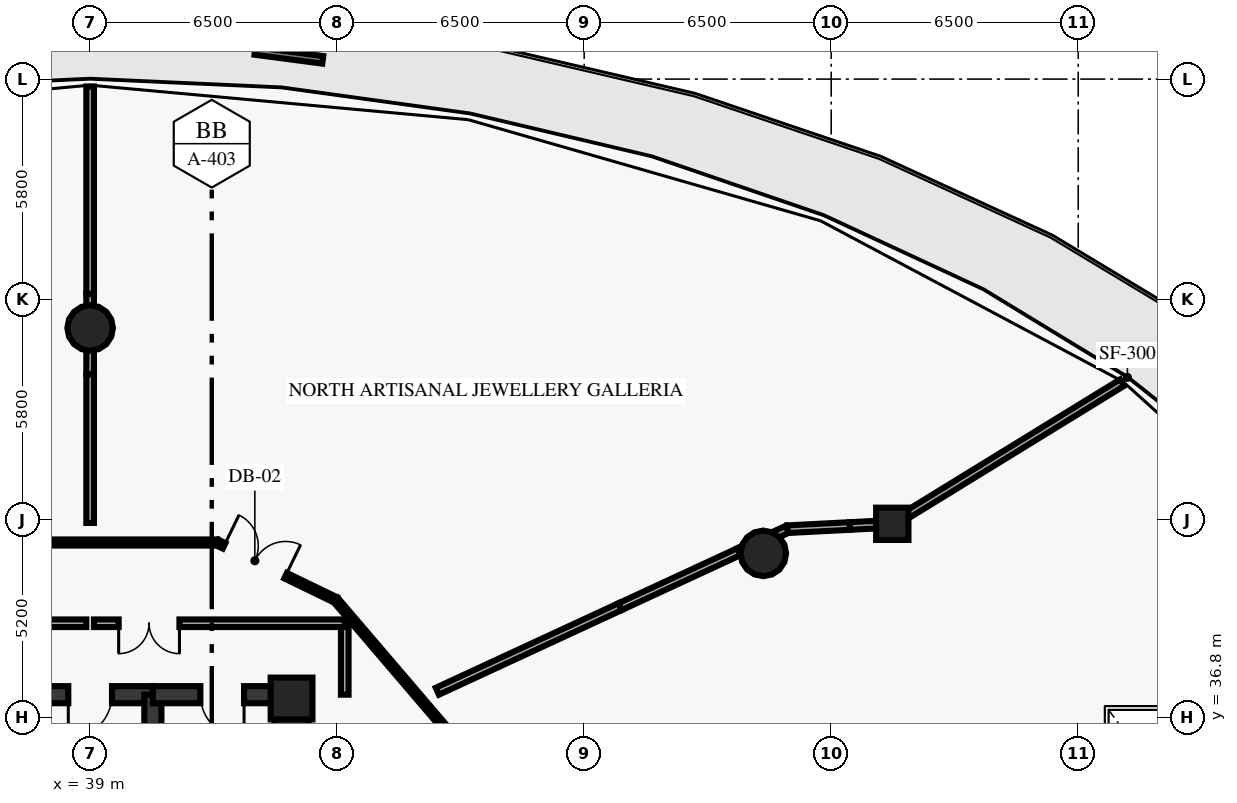
"""IFC4 building model, lengths in metres.
Left out: names, types, materials, properties, quantities, classifications, styles, units other than length and angle.
Written with IfcOpenShell. Run it as: python <this file> out.ifc"""

import sys

from ifc_helpers import new_model, si_unit, direction, frame, frame_2d, origin, origin_2d, place, context, subcontext, project, spatial, rectangle, circle, extrude, element, fill, save


model = new_model("IFC4")
c1 = context("Model", 3, precision=1e-05, world=origin(), true_north=direction((0.0, 1.0)))
c2 = subcontext(c1, "Body", "Model", "MODEL_VIEW")
j1 = project(units=[si_unit("LENGTHUNIT", "METRE"), si_unit("PLANEANGLEUNIT", "RADIAN")], contexts=[c1])
p1 = place(None, origin())
s1 = spatial("IfcSite", under=j1, at=p1, CompositionType="ELEMENT")
p2 = place(p1, origin())
s2 = spatial("IfcBuilding", under=s1, at=p2, CompositionType="ELEMENT")
p3 = place(p2, frame((0.0, 0.0, 6.0)))
s3 = spatial("IfcBuildingStorey", under=s2, at=p3, CompositionType="ELEMENT", Elevation=6.0)
p4 = place(p3, frame((44.3, 37.3, 0.0), z_axis=(0.0, 0.0, 1.0), x_axis=(1.0, 0.0, 0.0)))
e1 = element("IfcColumn", 1, at=p4, inside=s3, PredefinedType="PILASTER", context=c2, shape_type="SweptSolid", body=[
    extrude(rectangle(XDim=1.1, YDim=1.1, at=origin_2d()), origin(), (0.0, 0.0, 1.0), 4.7),
])
for number, where, z_axis, x_axis in (
    (2, (56.713, 41.119, 0.0), (0.0, 0.0, 1.0), (1.0, 0.0, 0.0)),
    (3, (39.0, 47.05, 0.0), (0.0, 0.0, 1.0), (1.0, 0.0, 0.0)),
):
    element("IfcColumn", number, at=place(p3, frame(where, z_axis=z_axis, x_axis=x_axis)), inside=s3, PredefinedType="COLUMN", context=c2, shape_type="SweptSolid", body=[
        extrude(circle(Radius=0.6, at=origin_2d()), origin(), (0.0, 0.0, 1.0), 4.7),
    ])
p5 = place(p3, frame((60.107, 41.897, 0.0), z_axis=(0.0, 0.0, 1.0), x_axis=(1.0, 0.0, 0.0)))
e4 = element("IfcColumn", 4, at=p5, inside=s3, PredefinedType="COLUMN", context=c2, shape_type="SweptSolid", body=[
    extrude(rectangle(XDim=0.85, YDim=0.85, at=origin_2d()), origin(), (0.0, 0.0, 1.0), 4.7),
])
p6 = place(p3, frame((44.3, 29.05, 0.0), z_axis=(0.0, 0.0, 1.0), x_axis=(0.0, 1.0, 0.0)))
e5 = element("IfcWall", 5, at=p6, inside=s3, PredefinedType="SHEAR", context=c2, shape_type="SweptSolid", body=[
    extrude(rectangle(XDim=8.35, YDim=0.9, at=frame_2d((4.175, 0.0))), origin(), (0.0, 0.0, 1.0), 4.7),
])
p7 = place(p3, frame((43.337, 54.341, 0.0), z_axis=(0.0, 0.0, 1.0), x_axis=(0.991429342672, -0.130644014367, 0.0)))
e6 = element("IfcWall", 6, at=p7, inside=s3, PredefinedType="ELEMENTEDWALL", context=c2, shape_type="SweptSolid", body=[
    extrude(rectangle(XDim=1.8, YDim=0.2, at=frame_2d((0.9, 0.0))), origin(), (0.0, 0.0, 1.0), 0.65),
])
p8 = place(p3, frame((40.65, 37.4, 0.0), z_axis=(0.0, 0.0, 1.0), x_axis=(-1.0, 0.0, 0.0)))
e7 = element("IfcWall", 7, at=p8, inside=s3, PredefinedType="SHEAR", context=c2, shape_type="SweptSolid", body=[
    extrude(rectangle(XDim=3.3, YDim=0.45, at=frame_2d((1.65, 0.0))), origin(), (0.0, 0.0, 1.0), 4.7),
])
p9 = place(p8, frame((1.075, 0.0, 0.0)))
e8 = element("IfcOpeningElement", 8, at=p9, cuts=e7, PredefinedType="OPENING", context=c2, shape_type="SweptSolid", body=[
    extrude(rectangle(XDim=1.15, YDim=2.15, at=frame_2d((0.575, 1.075))), frame((0.0, 0.235, 0.0), z_axis=(0.0, -1.0, 0.0), x_axis=(1.0, 0.0, 0.0)), (0.0, 0.0, 1.0), 0.47),
])
p10 = place(p3, frame((40.65, 29.05, 0.0), z_axis=(0.0, 0.0, 1.0), x_axis=(0.0, 1.0, 0.0)))
e9 = element("IfcWall", 9, at=p10, inside=s3, PredefinedType="SHEAR", context=c2, shape_type="SweptSolid", body=[
    extrude(rectangle(XDim=8.35, YDim=0.45, at=frame_2d((4.175, 0.0))), origin(), (0.0, 0.0, 1.0), 4.7),
])
p11 = place(p3, frame((44.3, 37.4, 0.0), z_axis=(0.0, 0.0, 1.0), x_axis=(-1.0, 0.0, 0.0)))
e10 = element("IfcWall", 10, at=p11, inside=s3, PredefinedType="SHEAR", context=c2, shape_type="SweptSolid", body=[
    extrude(rectangle(XDim=3.65, YDim=0.45, at=frame_2d((1.825, 0.0))), origin(), (0.0, 0.0, 1.0), 4.7),
])
p12 = place(p11, frame((1.25, 0.0, 0.0)))
e11 = element("IfcOpeningElement", 11, at=p12, cuts=e10, PredefinedType="OPENING", context=c2, shape_type="SweptSolid", body=[
    extrude(rectangle(XDim=1.15, YDim=2.15, at=frame_2d((0.575, 1.075))), frame((0.0, 0.235, 0.0), z_axis=(0.0, -1.0, 0.0), x_axis=(1.0, 0.0, 0.0)), (0.0, 0.0, 1.0), 0.47),
])
p13 = place(p3, frame((45.7, 37.4, 0.0), z_axis=(0.0, 0.0, 1.0), x_axis=(0.0, 1.0, 0.0)))
e12 = element("IfcWall", 12, at=p13, inside=s3, PredefinedType="SOLIDWALL", context=c2, shape_type="SweptSolid", body=[
    extrude(rectangle(XDim=1.88, YDim=0.2, at=frame_2d((0.94, 0.0))), origin(), (0.0, 0.0, 1.0), 4.7),
])
p14 = place(p3, frame((38.9, 39.28, 0.0), z_axis=(0.0, 0.0, 1.0), x_axis=(-1.0, 0.0, 0.0)))
e13 = element("IfcWall", 13, at=p14, inside=s3, PredefinedType="SOLIDWALL", context=c2, shape_type="SweptSolid", body=[
    extrude(rectangle(XDim=5.2, YDim=0.2, at=frame_2d((2.6, 0.0))), origin(), (0.0, 0.0, 1.0), 4.7),
])
p15 = place(p14, frame((1.95, 0.0, 0.0)))
e14 = element("IfcOpeningElement", 14, at=p15, cuts=e13, PredefinedType="OPENING", context=c2, shape_type="SweptSolid", body=[
    extrude(rectangle(XDim=1.6, YDim=2.2, at=frame_2d((0.8, 1.1))), frame((0.0, 0.11, 0.0), z_axis=(0.0, -1.0, 0.0), x_axis=(1.0, 0.0, 0.0)), (0.0, 0.0, 1.0), 0.22),
])
p16 = place(p3, frame((45.7, 39.28, 0.0), z_axis=(0.0, 0.0, 1.0), x_axis=(-1.0, 0.0, 0.0)))
e15 = element("IfcWall", 15, at=p16, inside=s3, PredefinedType="SOLIDWALL", context=c2, shape_type="SweptSolid", body=[
    extrude(rectangle(XDim=6.6, YDim=0.2, at=frame_2d((3.3, 0.0))), origin(), (0.0, 0.0, 1.0), 4.7),
])
p17 = place(p16, frame((4.35, 0.0, 0.0)))
e16 = element("IfcOpeningElement", 16, at=p17, cuts=e15, PredefinedType="OPENING", context=c2, shape_type="SweptSolid", body=[
    extrude(rectangle(XDim=1.6, YDim=2.2, at=frame_2d((0.8, 1.1))), frame((0.0, 0.11, 0.0), z_axis=(0.0, -1.0, 0.0), x_axis=(1.0, 0.0, 0.0)), (0.0, 0.0, 1.0), 0.22),
])
p18 = place(p3, frame((50.189, 34.36, 0.0), z_axis=(0.0, 0.0, 1.0), x_axis=(-0.649652680018, 0.760231145998, 0.0)))
e17 = element("IfcWall", 17, at=p18, inside=s3, PredefinedType="PARTITIONING", context=c2, shape_type="SweptSolid", body=[
    extrude(rectangle(XDim=7.279, YDim=0.16, at=frame_2d((3.64, 0.0))), origin(), (0.0, 0.0, 1.0), 4.7),
])
p19 = place(p3, frame((42.344, 41.405, 0.0), z_axis=(0.0, 0.0, 1.0), x_axis=(0.899789784655, -0.436323668199, 0.0)))
e18 = element("IfcWall", 18, at=p19, inside=s3, PredefinedType="PARTITIONING", context=c2, shape_type="SweptSolid", body=[
    extrude(rectangle(XDim=3.463, YDim=0.16, at=frame_2d((1.731, 0.0))), origin(), (0.0, 0.0, 1.0), 4.7),
])
p20 = place(p19, frame((0.2, 0.0, 0.0)))
e19 = element("IfcOpeningElement", 19, at=p20, cuts=e18, PredefinedType="OPENING", context=c2, shape_type="SweptSolid", body=[
    extrude(rectangle(XDim=1.8, YDim=2.3, at=frame_2d((0.9, 1.15))), frame((0.0, 0.09, 0.0), z_axis=(0.0, -1.0, 0.0), x_axis=(1.0, 0.0, 0.0)), (0.0, 0.0, 1.0), 0.18),
])
p21 = place(p3, frame((42.344, 41.405, 0.0), z_axis=(0.0, 0.0, 1.0), x_axis=(-1.0, 0.0, 0.0)))
e20 = element("IfcWall", 20, at=p21, inside=s3, PredefinedType="PARTITIONING", context=c2, shape_type="SweptSolid", body=[
    extrude(rectangle(XDim=6.688, YDim=0.16, at=frame_2d((3.344, 0.0))), origin(), (0.0, 0.0, 1.0), 4.7),
])
p22 = place(p3, frame((48.136, 37.491, 0.0), z_axis=(0.0, 0.0, 1.0), x_axis=(0.907524785669, 0.419998527851, 0.0)))
e21 = element("IfcWall", 21, at=p22, inside=s3, PredefinedType="PARTITIONING", context=c2, shape_type="SweptSolid", body=[
    extrude(rectangle(XDim=5.3, YDim=0.2, at=frame_2d((2.65, 0.0))), origin(), (0.0, 0.0, 1.0), 4.7),
])
p23 = place(p3, frame((52.946, 39.717, 0.0), z_axis=(0.0, 0.0, 1.0), x_axis=(0.90747190463, 0.420112773321, 0.0)))
e22 = element("IfcWall", 22, at=p23, inside=s3, PredefinedType="PARTITIONING", context=c2, shape_type="SweptSolid", body=[
    extrude(rectangle(XDim=3.449, YDim=0.2, at=frame_2d((1.725, 0.0))), origin(), (0.0, 0.0, 1.0), 3.92),
])
p24 = place(p3, frame((56.076, 41.166, 0.0), z_axis=(0.0, 0.0, 1.0), x_axis=(0.907622896373, 0.419786467124, 0.0)))
e23 = element("IfcWall", 23, at=p24, inside=s3, PredefinedType="PARTITIONING", context=c2, shape_type="SweptSolid", body=[
    extrude(rectangle(XDim=1.403, YDim=0.2, at=frame_2d((0.701, 0.0))), origin(), (0.0, 0.0, 1.0), 4.7),
])
p25 = place(p3, frame((57.349, 41.755, 0.0), z_axis=(0.0, 0.0, 1.0), x_axis=(0.998685128887, 0.051264152576, 0.0)))
e24 = element("IfcWall", 24, at=p25, inside=s3, PredefinedType="PARTITIONING", context=c2, shape_type="SweptSolid", body=[
    extrude(rectangle(XDim=1.643, YDim=0.2, at=frame_2d((0.822, 0.0))), origin(), (0.0, 0.0, 1.0), 4.7),
])
p26 = place(p3, frame((58.99, 41.839, 0.0), z_axis=(0.0, 0.0, 1.0), x_axis=(0.998660904733, 0.051733909163, 0.0)))
e25 = element("IfcWall", 25, at=p26, inside=s3, PredefinedType="PARTITIONING", context=c2, shape_type="SweptSolid", body=[
    extrude(rectangle(XDim=1.118, YDim=0.2, at=frame_2d((0.559, 0.0))), origin(), (0.0, 0.0, 1.0), 4.24),
])
p27 = place(p3, frame((60.107, 41.897, 0.0), z_axis=(0.0, 0.0, 1.0), x_axis=(0.85206305886, 0.523439149974, 0.0)))
e26 = element("IfcWall", 26, at=p27, inside=s3, PredefinedType="PARTITIONING", context=c2, shape_type="SweptSolid", body=[
    extrude(rectangle(XDim=7.099, YDim=0.2, at=frame_2d((3.55, 0.0))), origin(), (0.0, 0.0, 1.0), 4.7),
])
p28 = place(p3, frame((39.0, 41.92, 0.0), z_axis=(0.0, 0.0, 1.0), x_axis=(0.0, 1.0, 0.0)))
e27 = element("IfcWall", 27, at=p28, inside=s3, PredefinedType="PARTITIONING", context=c2, shape_type="SweptSolid", body=[
    extrude(rectangle(XDim=3.913, YDim=0.2, at=frame_2d((1.957, 0.0))), origin(), (0.0, 0.0, 1.0), 4.7),
])
p29 = place(p3, frame((39.0, 45.833, 0.0), z_axis=(0.0, 0.0, 1.0), x_axis=(0.0, 1.0, 0.0)))
e28 = element("IfcWall", 28, at=p29, inside=s3, PredefinedType="PARTITIONING", context=c2, shape_type="SweptSolid", body=[
    extrude(rectangle(XDim=1.234, YDim=0.2, at=frame_2d((0.617, 0.0))), origin(), (0.0, 0.0, 1.0), 4.165),
])
p30 = place(p3, frame((39.0, 47.067, 0.0), z_axis=(0.0, 0.0, 1.0), x_axis=(0.0, 1.0, 0.0)))
e29 = element("IfcWall", 29, at=p30, inside=s3, PredefinedType="PARTITIONING", context=c2, shape_type="SweptSolid", body=[
    extrude(rectangle(XDim=0.883, YDim=0.2, at=frame_2d((0.441, 0.0))), origin(), (0.0, 0.0, 1.0), 4.7),
])
p31 = place(p3, frame((39.0, 47.95, 0.0), z_axis=(0.0, 0.0, 1.0), x_axis=(0.0, 1.0, 0.0)))
e30 = element("IfcWall", 30, at=p31, inside=s3, PredefinedType="PARTITIONING", context=c2, shape_type="SweptSolid", body=[
    extrude(rectangle(XDim=5.455, YDim=0.2, at=frame_2d((2.728, 0.0))), origin(), (0.0, 0.0, 1.0), 4.7),
])
p32 = place(p9, origin())
e31 = element("IfcDoor", 31, at=p32, inside=s3, OperationType="SINGLE_SWING_RIGHT", PredefinedType="DOOR", context=c2, shape_type="SweptSolid", body=[
    extrude(rectangle(XDim=1.15, YDim=2.15, at=frame_2d((0.575, 1.075))), frame((0.0, 0.025, 0.0), z_axis=(0.0, -1.0, 0.0), x_axis=(1.0, 0.0, 0.0)), (0.0, 0.0, 1.0), 0.05),
])
fill(e8, e31)
p33 = place(p12, origin())
e32 = element("IfcDoor", 32, at=p33, inside=s3, OperationType="SINGLE_SWING_LEFT", PredefinedType="DOOR", context=c2, shape_type="SweptSolid", body=[
    extrude(rectangle(XDim=1.15, YDim=2.15, at=frame_2d((0.575, 1.075))), frame((0.0, 0.025, 0.0), z_axis=(0.0, -1.0, 0.0), x_axis=(1.0, 0.0, 0.0)), (0.0, 0.0, 1.0), 0.05),
])
fill(e11, e32)
p34 = place(p17, origin())
e33 = element("IfcDoor", 33, at=p34, inside=s3, OperationType="DOUBLE_DOOR_SINGLE_SWING", PredefinedType="DOOR", context=c2, shape_type="SweptSolid", body=[
    extrude(rectangle(XDim=1.6, YDim=2.2, at=frame_2d((0.8, 1.1))), frame((0.0, 0.025, 0.0), z_axis=(0.0, -1.0, 0.0), x_axis=(1.0, 0.0, 0.0)), (0.0, 0.0, 1.0), 0.05),
])
fill(e16, e33)
p35 = place(p20, origin())
e34 = element("IfcDoor", 34, at=p35, inside=s3, OperationType="DOUBLE_DOOR_SINGLE_SWING", PredefinedType="DOOR", context=c2, shape_type="SweptSolid", body=[
    extrude(rectangle(XDim=1.8, YDim=2.3, at=frame_2d((0.9, 1.15))), frame((0.0, 0.025, 0.0), z_axis=(0.0, -1.0, 0.0), x_axis=(1.0, 0.0, 0.0)), (0.0, 0.0, 1.0), 0.05),
])
fill(e19, e34)
save(model, sys.argv[1])
